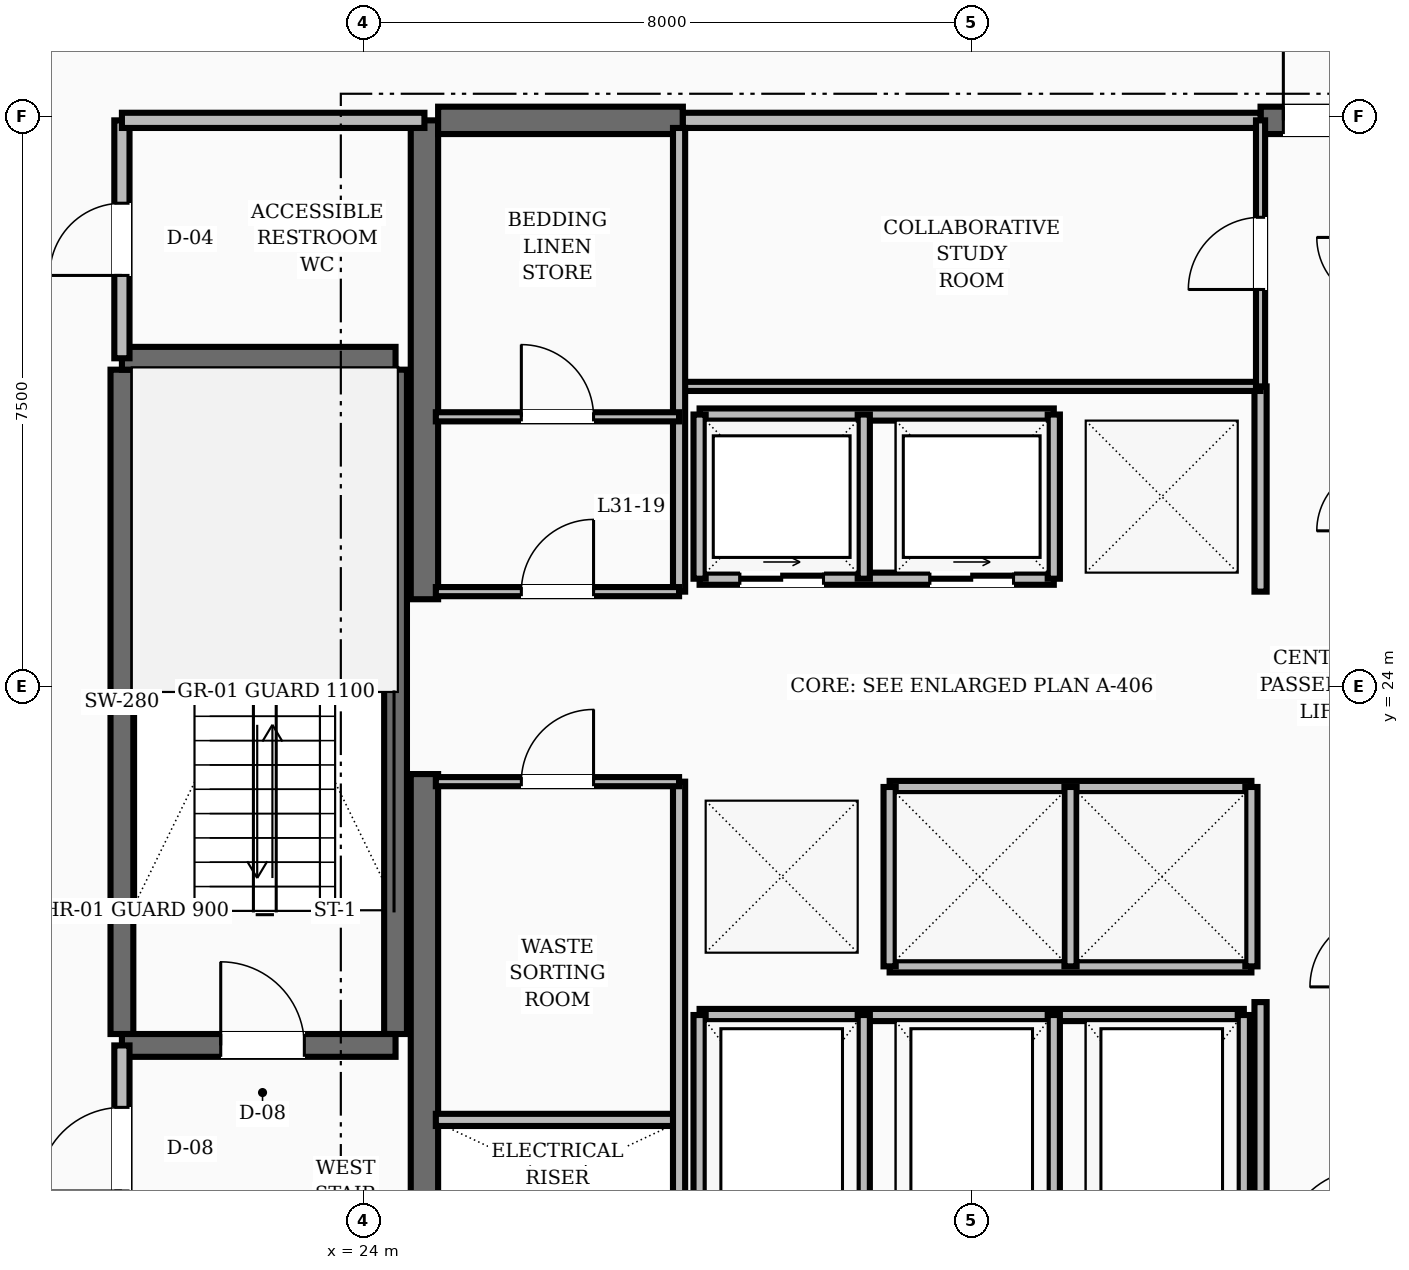
"""IFC4 building model, lengths in metres.
Left out: names, types, materials, properties, quantities, classifications, styles, units other than length and angle.
Written with IfcOpenShell. Run it as: python <this file> out.ifc"""

import sys

from ifc_helpers import new_model, si_unit, direction, frame, frame_2d, origin, place, context, subcontext, project, spatial, rectangle, extrude, element, fill, save


model = new_model("IFC4")
c1 = context("Model", 3, precision=1e-05, world=origin(), true_north=direction((0.0, 1.0)))
c2 = subcontext(c1, "Body", "Model", "MODEL_VIEW")
j1 = project(units=[si_unit("LENGTHUNIT", "METRE"), si_unit("PLANEANGLEUNIT", "RADIAN")], contexts=[c1])
p1 = place(None, origin())
s1 = spatial("IfcSite", under=j1, at=p1, CompositionType="ELEMENT")
p2 = place(p1, origin())
s2 = spatial("IfcBuilding", under=s1, at=p2, CompositionType="ELEMENT")
p3 = place(p2, frame((0.0, 0.0, 124.4)))
s3 = spatial("IfcBuildingStorey", under=s2, at=p3, CompositionType="ELEMENT", Elevation=124.4)
for number, where, z_axis, x_axis in (
    (1, (24.8, 16.55, 0.0), (0.0, 0.0, 1.0), (0.0, 1.0, 0.0)),
    (2, (24.8, 25.15, 0.0), (0.0, 0.0, 1.0), (0.0, 1.0, 0.0)),
):
    element("IfcWall", number, at=place(p3, frame(where, z_axis=z_axis, x_axis=x_axis)), inside=s3, PredefinedType="SHEAR", context=c2, shape_type="SweptSolid", body=[
        extrude(rectangle(XDim=6.3, YDim=0.36, at=frame_2d((3.15, 0.0))), origin(), (0.0, 0.0, 1.0), 3.6),
    ])
p4 = place(p3, frame((24.98, 31.45, 0.0), z_axis=(0.0, 0.0, 1.0), x_axis=(1.0, 0.0, 0.0)))
e3 = element("IfcWall", 3, at=p4, inside=s3, PredefinedType="SHEAR", context=c2, shape_type="SweptSolid", body=[
    extrude(rectangle(XDim=3.22, YDim=0.36, at=frame_2d((1.61, 0.0))), origin(), (0.0, 0.0, 1.0), 3.6),
])
p5 = place(p3, frame((35.8, 31.45, 0.0), z_axis=(0.0, 0.0, 1.0), x_axis=(1.0, 0.0, 0.0)))
e4 = element("IfcWall", 4, at=p5, inside=s3, PredefinedType="SHEAR", context=c2, shape_type="SweptSolid", body=[
    extrude(rectangle(XDim=3.22, YDim=0.36, at=frame_2d((1.61, 0.0))), origin(), (0.0, 0.0, 1.0), 3.6),
])
p6 = place(p5, frame((0.3, 0.0, 0.0)))
e5 = element("IfcOpeningElement", 5, at=p6, cuts=e4, PredefinedType="OPENING", context=c2, shape_type="SweptSolid", body=[
    extrude(rectangle(XDim=1.1, YDim=2.1, at=frame_2d((0.55, 1.05))), frame((0.0, 0.19, 0.0), z_axis=(0.0, -1.0, 0.0), x_axis=(1.0, 0.0, 0.0)), (0.0, 0.0, 1.0), 0.38),
])
for number, where, z_axis, x_axis in (
    (6, (20.82, 19.43, 0.0), (0.0, 0.0, 1.0), (0.0, 1.0, 0.0)),
    (7, (24.42, 19.43, 0.0), (0.0, 0.0, 1.0), (0.0, 1.0, 0.0)),
):
    element("IfcWall", number, at=place(p3, frame(where, z_axis=z_axis, x_axis=x_axis)), inside=s3, PredefinedType="SHEAR", context=c2, shape_type="SweptSolid", body=[
        extrude(rectangle(XDim=8.74, YDim=0.3, at=frame_2d((4.37, 0.0))), origin(), (0.0, 0.0, 1.0), 3.6),
    ])
p7 = place(p3, frame((20.82, 19.28, 0.0), z_axis=(0.0, 0.0, 1.0), x_axis=(1.0, 0.0, 0.0)))
e8 = element("IfcWall", 8, at=p7, inside=s3, PredefinedType="SHEAR", context=c2, shape_type="SweptSolid", body=[
    extrude(rectangle(XDim=3.6, YDim=0.3, at=frame_2d((1.8, 0.0))), origin(), (0.0, 0.0, 1.0), 3.6),
])
p8 = place(p7, frame((1.3, 0.0, 0.0)))
e9 = element("IfcOpeningElement", 9, at=p8, cuts=e8, PredefinedType="OPENING", context=c2, shape_type="SweptSolid", body=[
    extrude(rectangle(XDim=1.1, YDim=2.1, at=frame_2d((0.55, 1.05))), frame((0.0, 0.16, 0.0), z_axis=(0.0, -1.0, 0.0), x_axis=(1.0, 0.0, 0.0)), (0.0, 0.0, 1.0), 0.32),
])
p9 = place(p3, frame((20.82, 28.32, 0.0), z_axis=(0.0, 0.0, 1.0), x_axis=(1.0, 0.0, 0.0)))
e10 = element("IfcWall", 10, at=p9, inside=s3, PredefinedType="SHEAR", context=c2, shape_type="SweptSolid", body=[
    extrude(rectangle(XDim=3.6, YDim=0.3, at=frame_2d((1.8, 0.0))), origin(), (0.0, 0.0, 1.0), 3.6),
])
p10 = place(p3, frame((20.82, 16.55, 0.0), z_axis=(0.0, 0.0, 1.0), x_axis=(0.0, 1.0, 0.0)))
e11 = element("IfcWall", 11, at=p10, inside=s3, PredefinedType="SOLIDWALL", context=c2, shape_type="SweptSolid", body=[
    extrude(rectangle(XDim=2.73, YDim=0.2, at=frame_2d((1.365, 0.0))), origin(), (0.0, 0.0, 1.0), 2.8),
])
p11 = place(p10, frame((0.815, 0.0, 0.0)))
e12 = element("IfcOpeningElement", 12, at=p11, cuts=e11, PredefinedType="OPENING", context=c2, shape_type="SweptSolid", body=[
    extrude(rectangle(XDim=1.1, YDim=2.1, at=frame_2d((0.55, 1.05))), frame((0.0, 0.11, 0.0), z_axis=(0.0, -1.0, 0.0), x_axis=(1.0, 0.0, 0.0)), (0.0, 0.0, 1.0), 0.22),
])
p12 = place(p3, frame((20.82, 28.32, 0.0), z_axis=(0.0, 0.0, 1.0), x_axis=(0.0, 1.0, 0.0)))
e13 = element("IfcWall", 13, at=p12, inside=s3, PredefinedType="SOLIDWALL", context=c2, shape_type="SweptSolid", body=[
    extrude(rectangle(XDim=3.13, YDim=0.2, at=frame_2d((1.565, 0.0))), origin(), (0.0, 0.0, 1.0), 2.8),
])
p13 = place(p12, frame((1.09, 0.0, 0.0)))
e14 = element("IfcOpeningElement", 14, at=p13, cuts=e13, PredefinedType="OPENING", context=c2, shape_type="SweptSolid", body=[
    extrude(rectangle(XDim=0.95, YDim=2.1, at=frame_2d((0.475, 1.05))), frame((0.0, 0.11, 0.0), z_axis=(0.0, -1.0, 0.0), x_axis=(1.0, 0.0, 0.0)), (0.0, 0.0, 1.0), 0.22),
])
p14 = place(p3, frame((20.82, 31.45, 0.0), z_axis=(0.0, 0.0, 1.0), x_axis=(1.0, 0.0, 0.0)))
e15 = element("IfcWall", 15, at=p14, inside=s3, PredefinedType="SOLIDWALL", context=c2, shape_type="SweptSolid", body=[
    extrude(rectangle(XDim=3.98, YDim=0.2, at=frame_2d((1.99, 0.0))), origin(), (0.0, 0.0, 1.0), 2.8),
])
p15 = place(p3, frame((35.8, 16.55, 0.0), z_axis=(0.0, 0.0, 1.0), x_axis=(0.0, 1.0, 0.0)))
e16 = element("IfcWall", 16, at=p15, inside=s3, PredefinedType="SOLIDWALL", context=c2, shape_type="SweptSolid", body=[
    extrude(rectangle(XDim=3.3, YDim=0.16, at=frame_2d((1.65, 0.0))), origin(), (0.0, 0.0, 1.0), 2.8),
])
p16 = place(p3, frame((35.8, 25.25, 0.0), z_axis=(0.0, 0.0, 1.0), x_axis=(0.0, 1.0, 0.0)))
e17 = element("IfcWall", 17, at=p16, inside=s3, PredefinedType="SOLIDWALL", context=c2, shape_type="SweptSolid", body=[
    extrude(rectangle(XDim=2.7, YDim=0.16, at=frame_2d((1.35, 0.0))), origin(), (0.0, 0.0, 1.0), 2.8),
])
p17 = place(p3, frame((28.42, 25.42, 0.0), z_axis=(0.0, 0.0, 1.0), x_axis=(1.0, 0.0, 0.0)))
e18 = element("IfcWall", 18, at=p17, inside=s3, PredefinedType="SOLIDWALL", context=c2, shape_type="SweptSolid", body=[
    extrude(rectangle(XDim=4.66, YDim=0.16, at=frame_2d((2.33, 0.0))), origin(), (0.0, 0.0, 1.0), 2.8),
])
p18 = place(p17, frame((0.53, 0.0, 0.0)))
e19 = element("IfcOpeningElement", 19, at=p18, cuts=e18, PredefinedType="OPENING", context=c2, shape_type="SweptSolid", body=[
    extrude(rectangle(XDim=1.1, YDim=2.15, at=frame_2d((0.55, 1.075))), frame((0.0, 0.09, 0.0), z_axis=(0.0, -1.0, 0.0), x_axis=(1.0, 0.0, 0.0)), (0.0, 0.0, 1.0), 0.18),
])
p19 = place(p17, frame((3.03, 0.0, 0.0)))
e20 = element("IfcOpeningElement", 20, at=p19, cuts=e18, PredefinedType="OPENING", context=c2, shape_type="SweptSolid", body=[
    extrude(rectangle(XDim=1.1, YDim=2.15, at=frame_2d((0.55, 1.075))), frame((0.0, 0.09, 0.0), z_axis=(0.0, -1.0, 0.0), x_axis=(1.0, 0.0, 0.0)), (0.0, 0.0, 1.0), 0.18),
])
p20 = place(p3, frame((28.42, 27.58, 0.0), z_axis=(0.0, 0.0, 1.0), x_axis=(1.0, 0.0, 0.0)))
e21 = element("IfcWall", 21, at=p20, inside=s3, PredefinedType="SOLIDWALL", context=c2, shape_type="SweptSolid", body=[
    extrude(rectangle(XDim=4.66, YDim=0.16, at=frame_2d((2.33, 0.0))), origin(), (0.0, 0.0, 1.0), 2.8),
])
for number, where, z_axis, x_axis in (
    (22, (28.42, 25.42, 0.0), (0.0, 0.0, 1.0), (0.0, 1.0, 0.0)),
    (23, (30.58, 25.42, 0.0), (0.0, 0.0, 1.0), (0.0, 1.0, 0.0)),
    (24, (33.08, 25.42, 0.0), (0.0, 0.0, 1.0), (0.0, 1.0, 0.0)),
):
    element("IfcWall", number, at=place(p3, frame(where, z_axis=z_axis, x_axis=x_axis)), inside=s3, PredefinedType="SOLIDWALL", context=c2, shape_type="SweptSolid", body=[
        extrude(rectangle(XDim=2.16, YDim=0.16, at=frame_2d((1.08, 0.0))), origin(), (0.0, 0.0, 1.0), 2.8),
    ])
for number, where, z_axis, x_axis in (
    (25, (30.92, 22.68, 0.0), (0.0, 0.0, 1.0), (1.0, 0.0, 0.0)),
    (26, (30.92, 20.32, 0.0), (0.0, 0.0, 1.0), (1.0, 0.0, 0.0)),
):
    element("IfcWall", number, at=place(p3, frame(where, z_axis=z_axis, x_axis=x_axis)), inside=s3, PredefinedType="SOLIDWALL", context=c2, shape_type="SweptSolid", body=[
        extrude(rectangle(XDim=4.76, YDim=0.16, at=frame_2d((2.38, 0.0))), origin(), (0.0, 0.0, 1.0), 2.8),
    ])
for number, where, z_axis, x_axis in (
    (27, (30.92, 20.32, 0.0), (0.0, 0.0, 1.0), (0.0, 1.0, 0.0)),
    (28, (33.3, 20.32, 0.0), (0.0, 0.0, 1.0), (0.0, 1.0, 0.0)),
    (29, (35.68, 20.32, 0.0), (0.0, 0.0, 1.0), (0.0, 1.0, 0.0)),
):
    element("IfcWall", number, at=place(p3, frame(where, z_axis=z_axis, x_axis=x_axis)), inside=s3, PredefinedType="SOLIDWALL", context=c2, shape_type="SweptSolid", body=[
        extrude(rectangle(XDim=2.36, YDim=0.16, at=frame_2d((1.18, 0.0))), origin(), (0.0, 0.0, 1.0), 2.8),
    ])
p21 = place(p3, frame((28.42, 19.68, 0.0), z_axis=(0.0, 0.0, 1.0), x_axis=(1.0, 0.0, 0.0)))
e30 = element("IfcWall", 30, at=p21, inside=s3, PredefinedType="SOLIDWALL", context=c2, shape_type="SweptSolid", body=[
    extrude(rectangle(XDim=7.16, YDim=0.16, at=frame_2d((3.58, 0.0))), origin(), (0.0, 0.0, 1.0), 2.8),
])
for number, where, z_axis, x_axis in (
    (31, (28.42, 16.92, 0.0), (0.0, 0.0, 1.0), (0.0, 1.0, 0.0)),
    (32, (30.58, 16.92, 0.0), (0.0, 0.0, 1.0), (0.0, 1.0, 0.0)),
    (33, (33.08, 16.92, 0.0), (0.0, 0.0, 1.0), (0.0, 1.0, 0.0)),
    (34, (35.58, 16.92, 0.0), (0.0, 0.0, 1.0), (0.0, 1.0, 0.0)),
):
    element("IfcWall", number, at=place(p3, frame(where, z_axis=z_axis, x_axis=x_axis)), inside=s3, PredefinedType="SOLIDWALL", context=c2, shape_type="SweptSolid", body=[
        extrude(rectangle(XDim=2.76, YDim=0.16, at=frame_2d((1.38, 0.0))), origin(), (0.0, 0.0, 1.0), 2.8),
    ])
p22 = place(p3, frame((28.2, 31.45, 0.0), z_axis=(0.0, 0.0, 1.0), x_axis=(1.0, 0.0, 0.0)))
e35 = element("IfcWall", 35, at=p22, inside=s3, PredefinedType="SOLIDWALL", context=c2, shape_type="SweptSolid", body=[
    extrude(rectangle(XDim=7.6, YDim=0.2, at=frame_2d((3.8, 0.0))), origin(), (0.0, 0.0, 1.0), 2.8),
])
p23 = place(p3, frame((28.2, 27.95, 0.0), z_axis=(0.0, 0.0, 1.0), x_axis=(1.0, 0.0, 0.0)))
e36 = element("IfcWall", 36, at=p23, inside=s3, PredefinedType="PARTITIONING", context=c2, shape_type="SweptSolid", body=[
    extrude(rectangle(XDim=7.6, YDim=0.12, at=frame_2d((3.8, 0.0))), origin(), (0.0, 0.0, 1.0), 2.8),
])
p24 = place(p3, frame((35.8, 27.95, 0.0), z_axis=(0.0, 0.0, 1.0), x_axis=(0.0, 1.0, 0.0)))
e37 = element("IfcWall", 37, at=p24, inside=s3, PredefinedType="PARTITIONING", context=c2, shape_type="SweptSolid", body=[
    extrude(rectangle(XDim=3.5, YDim=0.12, at=frame_2d((1.75, 0.0))), origin(), (0.0, 0.0, 1.0), 2.8),
])
p25 = place(p24, frame((1.275, 0.0, 0.0)))
e38 = element("IfcOpeningElement", 38, at=p25, cuts=e37, PredefinedType="OPENING", context=c2, shape_type="SweptSolid", body=[
    extrude(rectangle(XDim=0.95, YDim=2.1, at=frame_2d((0.475, 1.05))), frame((0.0, 0.07, 0.0), z_axis=(0.0, -1.0, 0.0), x_axis=(1.0, 0.0, 0.0)), (0.0, 0.0, 1.0), 0.14),
])
p26 = place(p3, frame((24.95, 18.3, 0.0), z_axis=(0.0, 0.0, 1.0), x_axis=(1.0, 0.0, 0.0)))
e39 = element("IfcWall", 39, at=p26, inside=s3, PredefinedType="SOLIDWALL", context=c2, shape_type="SweptSolid", body=[
    extrude(rectangle(XDim=3.2, YDim=0.16, at=frame_2d((1.6, 0.0))), origin(), (0.0, 0.0, 1.0), 2.8),
])
p27 = place(p3, frame((28.15, 16.7, 0.0), z_axis=(0.0, 0.0, 1.0), x_axis=(0.0, 1.0, 0.0)))
e40 = element("IfcWall", 40, at=p27, inside=s3, PredefinedType="SOLIDWALL", context=c2, shape_type="SweptSolid", body=[
    extrude(rectangle(XDim=6.05, YDim=0.16, at=frame_2d((3.025, 0.0))), origin(), (0.0, 0.0, 1.0), 2.8),
])
p28 = place(p3, frame((28.15, 25.25, 0.0), z_axis=(0.0, 0.0, 1.0), x_axis=(0.0, 1.0, 0.0)))
e41 = element("IfcWall", 41, at=p28, inside=s3, PredefinedType="SOLIDWALL", context=c2, shape_type="SweptSolid", body=[
    extrude(rectangle(XDim=6.1, YDim=0.16, at=frame_2d((3.05, 0.0))), origin(), (0.0, 0.0, 1.0), 2.8),
])
p29 = place(p3, frame((24.95, 25.25, 0.0), z_axis=(0.0, 0.0, 1.0), x_axis=(1.0, 0.0, 0.0)))
e42 = element("IfcWall", 42, at=p29, inside=s3, PredefinedType="PARTITIONING", context=c2, shape_type="SweptSolid", body=[
    extrude(rectangle(XDim=3.2, YDim=0.12, at=frame_2d((1.6, 0.0))), origin(), (0.0, 0.0, 1.0), 2.8),
])
p30 = place(p29, frame((1.125, 0.0, 0.0)))
e43 = element("IfcOpeningElement", 43, at=p30, cuts=e42, PredefinedType="OPENING", context=c2, shape_type="SweptSolid", body=[
    extrude(rectangle(XDim=0.95, YDim=2.1, at=frame_2d((0.475, 1.05))), frame((0.0, 0.07, 0.0), z_axis=(0.0, -1.0, 0.0), x_axis=(1.0, 0.0, 0.0)), (0.0, 0.0, 1.0), 0.14),
])
p31 = place(p3, frame((24.95, 22.75, 0.0), z_axis=(0.0, 0.0, 1.0), x_axis=(1.0, 0.0, 0.0)))
e44 = element("IfcWall", 44, at=p31, inside=s3, PredefinedType="PARTITIONING", context=c2, shape_type="SweptSolid", body=[
    extrude(rectangle(XDim=3.2, YDim=0.12, at=frame_2d((1.6, 0.0))), origin(), (0.0, 0.0, 1.0), 2.8),
])
p32 = place(p31, frame((1.125, 0.0, 0.0)))
e45 = element("IfcOpeningElement", 45, at=p32, cuts=e44, PredefinedType="OPENING", context=c2, shape_type="SweptSolid", body=[
    extrude(rectangle(XDim=0.95, YDim=2.1, at=frame_2d((0.475, 1.05))), frame((0.0, 0.07, 0.0), z_axis=(0.0, -1.0, 0.0), x_axis=(1.0, 0.0, 0.0)), (0.0, 0.0, 1.0), 0.14),
])
p33 = place(p3, frame((24.95, 27.55, 0.0), z_axis=(0.0, 0.0, 1.0), x_axis=(1.0, 0.0, 0.0)))
e46 = element("IfcWall", 46, at=p33, inside=s3, PredefinedType="PARTITIONING", context=c2, shape_type="SweptSolid", body=[
    extrude(rectangle(XDim=3.2, YDim=0.12, at=frame_2d((1.6, 0.0))), origin(), (0.0, 0.0, 1.0), 2.8),
])
p34 = place(p33, frame((1.125, 0.0, 0.0)))
e47 = element("IfcOpeningElement", 47, at=p34, cuts=e46, PredefinedType="OPENING", context=c2, shape_type="SweptSolid", body=[
    extrude(rectangle(XDim=0.95, YDim=2.1, at=frame_2d((0.475, 1.05))), frame((0.0, 0.07, 0.0), z_axis=(0.0, -1.0, 0.0), x_axis=(1.0, 0.0, 0.0)), (0.0, 0.0, 1.0), 0.14),
])
p35 = place(p8, origin())
e48 = element("IfcDoor", 48, at=p35, inside=s3, OperationType="SINGLE_SWING_LEFT", PredefinedType="DOOR", context=c2, shape_type="SweptSolid", body=[
    extrude(rectangle(XDim=1.1, YDim=2.1, at=frame_2d((0.55, 1.05))), frame((0.0, 0.025, 0.0), z_axis=(0.0, -1.0, 0.0), x_axis=(1.0, 0.0, 0.0)), (0.0, 0.0, 1.0), 0.05),
])
fill(e9, e48)
p36 = place(p11, origin())
e49 = element("IfcDoor", 49, at=p36, inside=s3, OperationType="SINGLE_SWING_LEFT", PredefinedType="DOOR", context=c2, shape_type="SweptSolid", body=[
    extrude(rectangle(XDim=1.1, YDim=2.1, at=frame_2d((0.55, 1.05))), frame((0.0, 0.025, 0.0), z_axis=(0.0, -1.0, 0.0), x_axis=(1.0, 0.0, 0.0)), (0.0, 0.0, 1.0), 0.05),
])
fill(e12, e49)
p37 = place(p13, origin())
e50 = element("IfcDoor", 50, at=p37, inside=s3, OperationType="SINGLE_SWING_LEFT", PredefinedType="DOOR", context=c2, shape_type="SweptSolid", body=[
    extrude(rectangle(XDim=0.95, YDim=2.1, at=frame_2d((0.475, 1.05))), frame((0.0, 0.025, 0.0), z_axis=(0.0, -1.0, 0.0), x_axis=(1.0, 0.0, 0.0)), (0.0, 0.0, 1.0), 0.05),
])
fill(e14, e50)
p38 = place(p6, origin())
e51 = element("IfcDoor", 51, at=p38, inside=s3, OperationType="SINGLE_SWING_LEFT", PredefinedType="DOOR", context=c2, shape_type="SweptSolid", body=[
    extrude(rectangle(XDim=1.1, YDim=2.1, at=frame_2d((0.55, 1.05))), frame((0.0, 0.025, 0.0), z_axis=(0.0, -1.0, 0.0), x_axis=(1.0, 0.0, 0.0)), (0.0, 0.0, 1.0), 0.05),
])
fill(e5, e51)
p39 = place(p18, origin())
e52 = element("IfcDoor", 52, at=p39, inside=s3, OperationType="SLIDING_TO_RIGHT", PredefinedType="DOOR", context=c2, shape_type="SweptSolid", body=[
    extrude(rectangle(XDim=1.1, YDim=2.15, at=frame_2d((0.55, 1.075))), frame((0.0, 0.025, 0.0), z_axis=(0.0, -1.0, 0.0), x_axis=(1.0, 0.0, 0.0)), (0.0, 0.0, 1.0), 0.05),
])
fill(e19, e52)
p40 = place(p19, origin())
e53 = element("IfcDoor", 53, at=p40, inside=s3, OperationType="SLIDING_TO_RIGHT", PredefinedType="DOOR", context=c2, shape_type="SweptSolid", body=[
    extrude(rectangle(XDim=1.1, YDim=2.15, at=frame_2d((0.55, 1.075))), frame((0.0, 0.025, 0.0), z_axis=(0.0, -1.0, 0.0), x_axis=(1.0, 0.0, 0.0)), (0.0, 0.0, 1.0), 0.05),
])
fill(e20, e53)
p41 = place(p25, origin())
e54 = element("IfcDoor", 54, at=p41, inside=s3, OperationType="SINGLE_SWING_LEFT", PredefinedType="DOOR", context=c2, shape_type="SweptSolid", body=[
    extrude(rectangle(XDim=0.95, YDim=2.1, at=frame_2d((0.475, 1.05))), frame((0.0, 0.025, 0.0), z_axis=(0.0, -1.0, 0.0), x_axis=(1.0, 0.0, 0.0)), (0.0, 0.0, 1.0), 0.05),
])
fill(e38, e54)
p42 = place(p30, origin())
e55 = element("IfcDoor", 55, at=p42, inside=s3, OperationType="SINGLE_SWING_RIGHT", PredefinedType="DOOR", context=c2, shape_type="SweptSolid", body=[
    extrude(rectangle(XDim=0.95, YDim=2.1, at=frame_2d((0.475, 1.05))), frame((0.0, 0.025, 0.0), z_axis=(0.0, -1.0, 0.0), x_axis=(1.0, 0.0, 0.0)), (0.0, 0.0, 1.0), 0.05),
])
fill(e43, e55)
p43 = place(p34, origin())
e56 = element("IfcDoor", 56, at=p43, inside=s3, OperationType="SINGLE_SWING_LEFT", PredefinedType="DOOR", context=c2, shape_type="SweptSolid", body=[
    extrude(rectangle(XDim=0.95, YDim=2.1, at=frame_2d((0.475, 1.05))), frame((0.0, 0.025, 0.0), z_axis=(0.0, -1.0, 0.0), x_axis=(1.0, 0.0, 0.0)), (0.0, 0.0, 1.0), 0.05),
])
fill(e47, e56)
p44 = place(p32, origin())
e57 = element("IfcDoor", 57, at=p44, inside=s3, OperationType="SINGLE_SWING_RIGHT", PredefinedType="DOOR", context=c2, shape_type="SweptSolid", body=[
    extrude(rectangle(XDim=0.95, YDim=2.1, at=frame_2d((0.475, 1.05))), frame((0.0, 0.025, 0.0), z_axis=(0.0, -1.0, 0.0), x_axis=(1.0, 0.0, 0.0)), (0.0, 0.0, 1.0), 0.05),
])
fill(e45, e57)
save(model, sys.argv[1])
